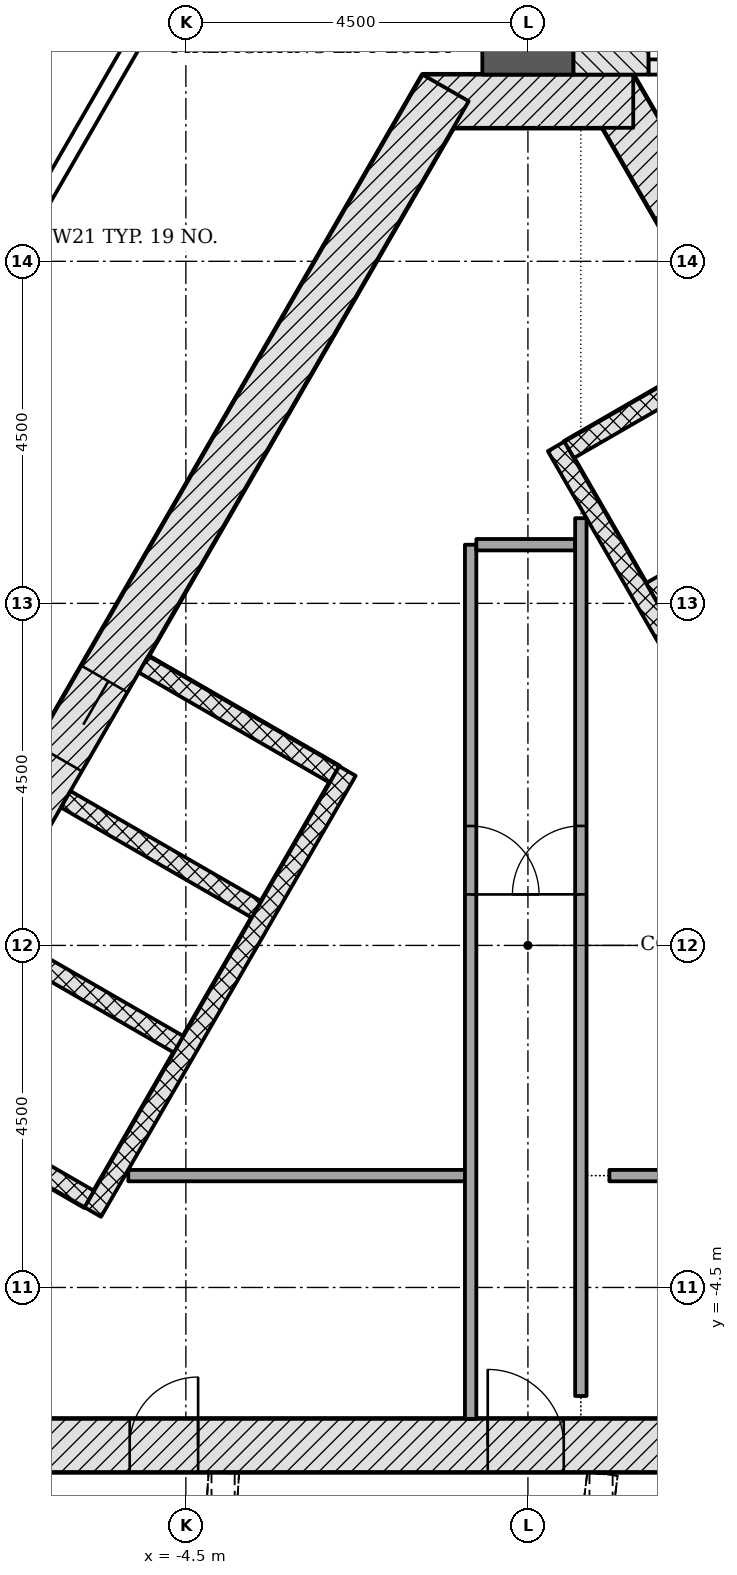
"""IFC4 building model, lengths in metres.
Left out: names, types, materials, properties, quantities, classifications, styles, units other than length and angle.
Written with IfcOpenShell. Run it as: python <this file> out.ifc"""

import sys

from ifc_helpers import new_model, si_unit, direction, frame, frame_2d, origin, place, context, subcontext, project, spatial, rectangle, extrude, element, fill, save


model = new_model("IFC4")
c1 = context("Model", 3, precision=1e-05, world=origin(), true_north=direction((0.0, 1.0)))
c2 = subcontext(c1, "Body", "Model", "MODEL_VIEW")
j1 = project(units=[si_unit("LENGTHUNIT", "METRE"), si_unit("PLANEANGLEUNIT", "RADIAN")], contexts=[c1])
p1 = place(None, origin())
s1 = spatial("IfcSite", under=j1, at=p1, CompositionType="ELEMENT")
p2 = place(p1, origin())
s2 = spatial("IfcBuilding", under=s1, at=p2, CompositionType="ELEMENT")
p3 = place(p2, frame((0.0, 0.0, 210.3)))
s3 = spatial("IfcBuildingStorey", under=s2, at=p3, CompositionType="ELEMENT", Elevation=210.3)
p4 = place(p3, frame((-9.229, -6.578, -0.3), z_axis=(0.0, 0.0, 1.0), x_axis=(1.0, 0.0, 0.0)))
e1 = element("IfcWall", 1, at=p4, inside=s3, PredefinedType="SHEAR", context=c2, shape_type="SweptSolid", body=[
    extrude(rectangle(XDim=18.458, YDim=0.7, at=frame_2d((9.229, 0.0))), origin(), (0.0, 0.0, 1.0), 4.6),
])
p5 = place(p4, frame((8.7, 0.0, 0.3)))
e2 = element("IfcOpeningElement", 2, at=p5, cuts=e1, PredefinedType="OPENING", context=c2, shape_type="SweptSolid", body=[
    extrude(rectangle(XDim=1.0, YDim=2.1, at=frame_2d((0.5, 1.05))), frame((0.0, 0.36, 0.0), z_axis=(0.0, -1.0, 0.0), x_axis=(1.0, 0.0, 0.0)), (0.0, 0.0, 1.0), 0.72),
])
p6 = place(p4, frame((3.99, 0.0, 0.3)))
e3 = element("IfcOpeningElement", 3, at=p6, cuts=e1, PredefinedType="OPENING", context=c2, shape_type="SweptSolid", body=[
    extrude(rectangle(XDim=0.9, YDim=2.1, at=frame_2d((0.45, 1.05))), frame((0.0, 0.36, 0.0), z_axis=(0.0, -1.0, 0.0), x_axis=(1.0, 0.0, 0.0)), (0.0, 0.0, 1.0), 0.72),
])
p7 = place(p4, frame((13.539, 0.0, 0.3)))
e4 = element("IfcOpeningElement", 4, at=p7, cuts=e1, PredefinedType="OPENING", context=c2, shape_type="SweptSolid", body=[
    extrude(rectangle(XDim=0.9, YDim=2.1, at=frame_2d((0.45, 1.05))), frame((0.0, 0.36, 0.0), z_axis=(0.0, -1.0, 0.0), x_axis=(1.0, 0.0, 0.0)), (0.0, 0.0, 1.0), 0.72),
])
p8 = place(p3, frame((10.311, -4.703, -0.3), z_axis=(0.0, 0.0, 1.0), x_axis=(-0.500001446645, 0.866024568562, 0.0)))
e5 = element("IfcWall", 5, at=p8, inside=s3, PredefinedType="SHEAR", context=c2, shape_type="SweptSolid", body=[
    extrude(rectangle(XDim=18.458, YDim=0.7, at=frame_2d((9.229, 0.0))), origin(), (0.0, 0.0, 1.0), 4.6),
])
p9 = place(p3, frame((1.386, 11.106, -0.3), z_axis=(0.0, 0.0, 1.0), x_axis=(-1.0, 0.0, 0.0)))
e6 = element("IfcWall", 6, at=p9, inside=s3, PredefinedType="SHEAR", context=c2, shape_type="SweptSolid", body=[
    extrude(rectangle(XDim=2.771, YDim=0.7, at=frame_2d((1.386, 0.0))), origin(), (0.0, 0.0, 1.0), 4.6),
])
p10 = place(p3, frame((-1.083, 11.281, -0.3), z_axis=(0.0, 0.0, 1.0), x_axis=(-0.500001446645, -0.866024568562, 0.0)))
e7 = element("IfcWall", 7, at=p10, inside=s3, PredefinedType="SHEAR", context=c2, shape_type="SweptSolid", body=[
    extrude(rectangle(XDim=18.458, YDim=0.7, at=frame_2d((9.229, 0.0))), origin(), (0.0, 0.0, 1.0), 4.6),
])
p11 = place(p10, frame((8.979, 0.0, 0.3)))
e8 = element("IfcOpeningElement", 8, at=p11, cuts=e7, PredefinedType="OPENING", context=c2, shape_type="SweptSolid", body=[
    extrude(rectangle(XDim=1.2, YDim=2.1, at=frame_2d((0.6, 1.05))), frame((0.0, 0.36, 0.0), z_axis=(0.0, -1.0, 0.0), x_axis=(1.0, 0.0, 0.0)), (0.0, 0.0, 1.0), 0.72),
])
p12 = place(p10, frame((11.029, 0.0, 0.3)))
e9 = element("IfcOpeningElement", 9, at=p12, cuts=e7, PredefinedType="OPENING", context=c2, shape_type="SweptSolid", body=[
    extrude(rectangle(XDim=1.2, YDim=2.1, at=frame_2d((0.6, 1.05))), frame((0.0, 0.36, 0.0), z_axis=(0.0, -1.0, 0.0), x_axis=(1.0, 0.0, 0.0)), (0.0, 0.0, 1.0), 0.72),
])
p13 = place(p3, frame((0.0, 11.456, -0.3), z_axis=(0.0, 0.0, 1.0), x_axis=(0.0, 1.0, 0.0)))
e10 = element("IfcWall", 10, at=p13, inside=s3, PredefinedType="SHEAR", context=c2, shape_type="SweptSolid", body=[
    extrude(rectangle(XDim=8.359, YDim=1.2, at=frame_2d((4.179, 0.0))), origin(), (0.0, 0.0, 1.0), 4.6),
])
for number, where, z_axis, x_axis in (
    (11, (3.781, 5.907, -0.3), (0.0, 0.0, 1.0), (-0.866, -0.5, 0.0)),
    (12, (2.706, 7.769, -0.3), (0.0, 0.0, 1.0), (-0.866, -0.5, 0.0)),
):
    element("IfcWall", number, at=place(p3, frame(where, z_axis=z_axis, x_axis=x_axis)), inside=s3, PredefinedType="PARTITIONING", context=c2, shape_type="SweptSolid", body=[
        extrude(rectangle(XDim=2.5, YDim=0.25, at=frame_2d((1.25, 0.0))), origin(), (0.0, 0.0, 1.0), 4.6),
    ])
p14 = place(p3, frame((5.87, -2.961, 0.0), z_axis=(0.0, 0.0, 1.0), x_axis=(-0.50000615651, 0.866021849293, 0.0)))
e13 = element("IfcWall", 13, at=p14, inside=s3, PredefinedType="PARTITIONING", context=c2, shape_type="SweptSolid", body=[
    extrude(rectangle(XDim=11.0, YDim=0.25, at=frame_2d((5.5, 0.0))), origin(), (0.0, 0.0, 1.0), 4.3),
])
for number, where, z_axis, x_axis in (
    (14, (-5.056, 3.699, -0.3), (0.0, 0.0, 1.0), (0.866, -0.5, 0.0)),
    (15, (-6.081, 1.923, -0.3), (0.0, 0.0, 1.0), (0.866, -0.5, 0.0)),
    (16, (-7.106, 0.148, -0.3), (0.0, 0.0, 1.0), (0.866, -0.5, 0.0)),
    (17, (-8.281, -1.887, -0.3), (0.0, 0.0, 1.0), (0.866, -0.5, 0.0)),
):
    element("IfcWall", number, at=place(p3, frame(where, z_axis=z_axis, x_axis=x_axis)), inside=s3, PredefinedType="PARTITIONING", context=c2, shape_type="SweptSolid", body=[
        extrude(rectangle(XDim=2.9, YDim=0.25, at=frame_2d((1.45, 0.0))), origin(), (0.0, 0.0, 1.0), 4.6),
    ])
p15 = place(p3, frame((-2.374, 2.294, 0.0), z_axis=(0.0, 0.0, 1.0), x_axis=(-0.500003174267, -0.866023571113, 0.0)))
e18 = element("IfcWall", 18, at=p15, inside=s3, PredefinedType="PARTITIONING", context=c2, shape_type="SweptSolid", body=[
    extrude(rectangle(XDim=6.7, YDim=0.25, at=frame_2d((3.35, 0.0))), origin(), (0.0, 0.0, 1.0), 4.3),
])
p16 = place(p3, frame((-5.258, -3.028, 0.0), z_axis=(0.0, 0.0, 1.0), x_axis=(1.0, 0.0, 0.0)))
e19 = element("IfcWall", 19, at=p16, inside=s3, PredefinedType="PARTITIONING", context=c2, shape_type="SweptSolid", body=[
    extrude(rectangle(XDim=4.429, YDim=0.15, at=frame_2d((2.215, 0.0))), origin(), (0.0, 0.0, 1.0), 4.3),
])
p17 = place(p3, frame((-0.754, 5.272, 0.0), z_axis=(0.0, 0.0, 1.0), x_axis=(0.0, -1.0, 0.0)))
e20 = element("IfcWall", 20, at=p17, inside=s3, PredefinedType="PARTITIONING", context=c2, shape_type="SweptSolid", body=[
    extrude(rectangle(XDim=11.5, YDim=0.15, at=frame_2d((5.75, 0.0))), origin(), (0.0, 0.0, 1.0), 4.3),
])
p18 = place(p17, frame((3.701, 0.0, 0.0)))
e21 = element("IfcOpeningElement", 21, at=p18, cuts=e20, PredefinedType="OPENING", context=c2, shape_type="SweptSolid", body=[
    extrude(rectangle(XDim=0.9, YDim=2.1, at=frame_2d((0.45, 1.05))), frame((0.0, 0.085, 0.0), z_axis=(0.0, -1.0, 0.0), x_axis=(1.0, 0.0, 0.0)), (0.0, 0.0, 1.0), 0.17),
])
p19 = place(p3, frame((-0.679, 5.272, 0.0), z_axis=(0.0, 0.0, 1.0), x_axis=(1.0, 0.0, 0.0)))
e22 = element("IfcWall", 22, at=p19, inside=s3, PredefinedType="PARTITIONING", context=c2, shape_type="SweptSolid", body=[
    extrude(rectangle(XDim=1.3, YDim=0.15, at=frame_2d((0.65, 0.0))), origin(), (0.0, 0.0, 1.0), 4.3),
])
p20 = place(p3, frame((0.696, -5.928, 0.0), z_axis=(0.0, 0.0, 1.0), x_axis=(0.0, 1.0, 0.0)))
e23 = element("IfcWall", 23, at=p20, inside=s3, PredefinedType="PARTITIONING", context=c2, shape_type="SweptSolid", body=[
    extrude(rectangle(XDim=11.549, YDim=0.15, at=frame_2d((5.774, 0.0))), origin(), (0.0, 0.0, 1.0), 4.3),
])
p21 = place(p20, frame((6.6, 0.0, 0.0)))
e24 = element("IfcOpeningElement", 24, at=p21, cuts=e23, PredefinedType="OPENING", context=c2, shape_type="SweptSolid", body=[
    extrude(rectangle(XDim=0.9, YDim=2.1, at=frame_2d((0.45, 1.05))), frame((0.0, 0.085, 0.0), z_axis=(0.0, -1.0, 0.0), x_axis=(1.0, 0.0, 0.0)), (0.0, 0.0, 1.0), 0.17),
])
p22 = place(p3, frame((1.071, -3.028, 0.0), z_axis=(0.0, 0.0, 1.0), x_axis=(1.0, 0.0, 0.0)))
e25 = element("IfcWall", 25, at=p22, inside=s3, PredefinedType="PARTITIONING", context=c2, shape_type="SweptSolid", body=[
    extrude(rectangle(XDim=7.569, YDim=0.15, at=frame_2d((3.784, 0.0))), origin(), (0.0, 0.0, 1.0), 4.3),
])
p23 = place(p3, frame((5.135, 11.556, -0.3), z_axis=(0.0, 0.0, 1.0), x_axis=(-1.0, 0.0, 0.0)))
e26 = element("IfcWall", 26, at=p23, inside=s3, PredefinedType="SHEAR", context=c2, shape_type="SweptSolid", body=[
    extrude(rectangle(XDim=3.55, YDim=0.2, at=frame_2d((1.775, 0.0))), origin(), (0.0, 0.0, 1.0), 4.6),
])
p24 = place(p23, frame((1.175, 0.0, 0.3)))
e27 = element("IfcOpeningElement", 27, at=p24, cuts=e26, PredefinedType="OPENING", context=c2, shape_type="SweptSolid", body=[
    extrude(rectangle(XDim=1.2, YDim=2.1, at=frame_2d((0.6, 1.05))), frame((0.0, 0.11, 0.0), z_axis=(0.0, -1.0, 0.0), x_axis=(1.0, 0.0, 0.0)), (0.0, 0.0, 1.0), 0.22),
])
p25 = place(p3, frame((1.093, 11.456, -0.3), z_axis=(0.0, 0.0, 1.0), x_axis=(0.0, 1.0, 0.0)))
e28 = element("IfcWall", 28, at=p25, inside=s3, PredefinedType="SHEAR", context=c2, shape_type="SweptSolid", body=[
    extrude(rectangle(XDim=7.2, YDim=0.986, at=frame_2d((3.6, 0.0))), origin(), (0.0, 0.0, 1.0), 4.6),
])
p26 = place(p3, frame((-0.68, 19.678, 0.0), z_axis=(0.0, 0.0, 1.0), x_axis=(-0.49999622545, -0.866027583011, 0.0)))
e29 = element("IfcWall", 29, at=p26, inside=s3, PredefinedType="PARTITIONING", context=c2, shape_type="SweptSolid", body=[
    extrude(rectangle(XDim=23.956, YDim=0.2, at=frame_2d((11.978, 0.0))), origin(), (0.0, 0.0, 1.0), 3.752),
])
p27 = place(p26, frame((16.301, 0.0, 0.0)))
e30 = element("IfcOpeningElement", 30, at=p27, cuts=e29, PredefinedType="OPENING", context=c2, shape_type="SweptSolid", body=[
    extrude(rectangle(XDim=1.2, YDim=2.1, at=frame_2d((0.6, 1.05))), frame((0.0, 0.11, 0.0), z_axis=(0.0, -1.0, 0.0), x_axis=(1.0, 0.0, 0.0)), (0.0, 0.0, 1.0), 0.22),
])
p28 = place(p3, frame((-16.104, -3.037, 0.0), z_axis=(0.0, 0.0, 1.0), x_axis=(0.499996511208, 0.86602741803, 0.0)))
e31 = element("IfcWall", 31, at=p28, inside=s3, PredefinedType="PARTITIONING", context=c2, shape_type="SweptSolid", body=[
    extrude(rectangle(XDim=29.74, YDim=0.2, at=frame_2d((14.87, 0.0))), origin(), (0.0, 0.0, 1.0), 3.752),
])
p29 = place(p28, frame((19.661, 0.0, 0.0)))
e32 = element("IfcOpeningElement", 32, at=p29, cuts=e31, PredefinedType="OPENING", context=c2, shape_type="SweptSolid", body=[
    extrude(rectangle(XDim=1.0, YDim=2.1, at=frame_2d((0.5, 1.05))), frame((0.0, 0.11, 0.0), z_axis=(0.0, -1.0, 0.0), x_axis=(1.0, 0.0, 0.0)), (0.0, 0.0, 1.0), 0.22),
])
p30 = place(p28, frame((7.86, 0.0, 0.0)))
e33 = element("IfcOpeningElement", 33, at=p30, cuts=e31, PredefinedType="OPENING", context=c2, shape_type="SweptSolid", body=[
    extrude(rectangle(XDim=1.0, YDim=2.1, at=frame_2d((0.5, 1.05))), frame((0.0, 0.11, 0.0), z_axis=(0.0, -1.0, 0.0), x_axis=(1.0, 0.0, 0.0)), (0.0, 0.0, 1.0), 0.22),
])
p31 = place(p28, frame((2.64, 0.0, 0.0)))
e34 = element("IfcOpeningElement", 34, at=p31, cuts=e31, PredefinedType="OPENING", context=c2, shape_type="SweptSolid", body=[
    extrude(rectangle(XDim=1.0, YDim=2.1, at=frame_2d((0.5, 1.05))), frame((0.0, 0.11, 0.0), z_axis=(0.0, -1.0, 0.0), x_axis=(1.0, 0.0, 0.0)), (0.0, 0.0, 1.0), 0.22),
])
p32 = place(p11, origin())
e35 = element("IfcDoor", 35, at=p32, inside=s3, OperationType="DOUBLE_DOOR_SLIDING", PredefinedType="DOOR", context=c2, shape_type="SweptSolid", body=[
    extrude(rectangle(XDim=1.2, YDim=2.1, at=frame_2d((0.6, 1.05))), frame((0.0, 0.025, 0.0), z_axis=(0.0, -1.0, 0.0), x_axis=(1.0, 0.0, 0.0)), (0.0, 0.0, 1.0), 0.05),
])
fill(e8, e35)
p33 = place(p5, origin())
e36 = element("IfcDoor", 36, at=p33, inside=s3, OperationType="SINGLE_SWING_LEFT", PredefinedType="DOOR", context=c2, shape_type="SweptSolid", body=[
    extrude(rectangle(XDim=1.0, YDim=2.1, at=frame_2d((0.5, 1.05))), frame((0.0, 0.075, 0.0), z_axis=(0.0, -1.0, 0.0), x_axis=(1.0, 0.0, 0.0)), (0.0, 0.0, 1.0), 0.15),
])
fill(e2, e36)
p34 = place(p6, origin())
e37 = element("IfcDoor", 37, at=p34, inside=s3, OperationType="SINGLE_SWING_RIGHT", PredefinedType="DOOR", context=c2, shape_type="SweptSolid", body=[
    extrude(rectangle(XDim=0.9, YDim=2.1, at=frame_2d((0.45, 1.05))), frame((0.0, 0.075, 0.0), z_axis=(0.0, -1.0, 0.0), x_axis=(1.0, 0.0, 0.0)), (0.0, 0.0, 1.0), 0.15),
])
fill(e3, e37)
p35 = place(p18, origin())
e38 = element("IfcDoor", 38, at=p35, inside=s3, OperationType="SINGLE_SWING_RIGHT", PredefinedType="DOOR", context=c2, shape_type="SweptSolid", body=[
    extrude(rectangle(XDim=0.9, YDim=2.1, at=frame_2d((0.45, 1.05))), frame((0.0, 0.025, 0.0), z_axis=(0.0, -1.0, 0.0), x_axis=(1.0, 0.0, 0.0)), (0.0, 0.0, 1.0), 0.05),
])
fill(e21, e38)
p36 = place(p21, origin())
e39 = element("IfcDoor", 39, at=p36, inside=s3, OperationType="SINGLE_SWING_LEFT", PredefinedType="DOOR", context=c2, shape_type="SweptSolid", body=[
    extrude(rectangle(XDim=0.9, YDim=2.1, at=frame_2d((0.45, 1.05))), frame((0.0, 0.025, 0.0), z_axis=(0.0, -1.0, 0.0), x_axis=(1.0, 0.0, 0.0)), (0.0, 0.0, 1.0), 0.05),
])
fill(e24, e39)
save(model, sys.argv[1])
